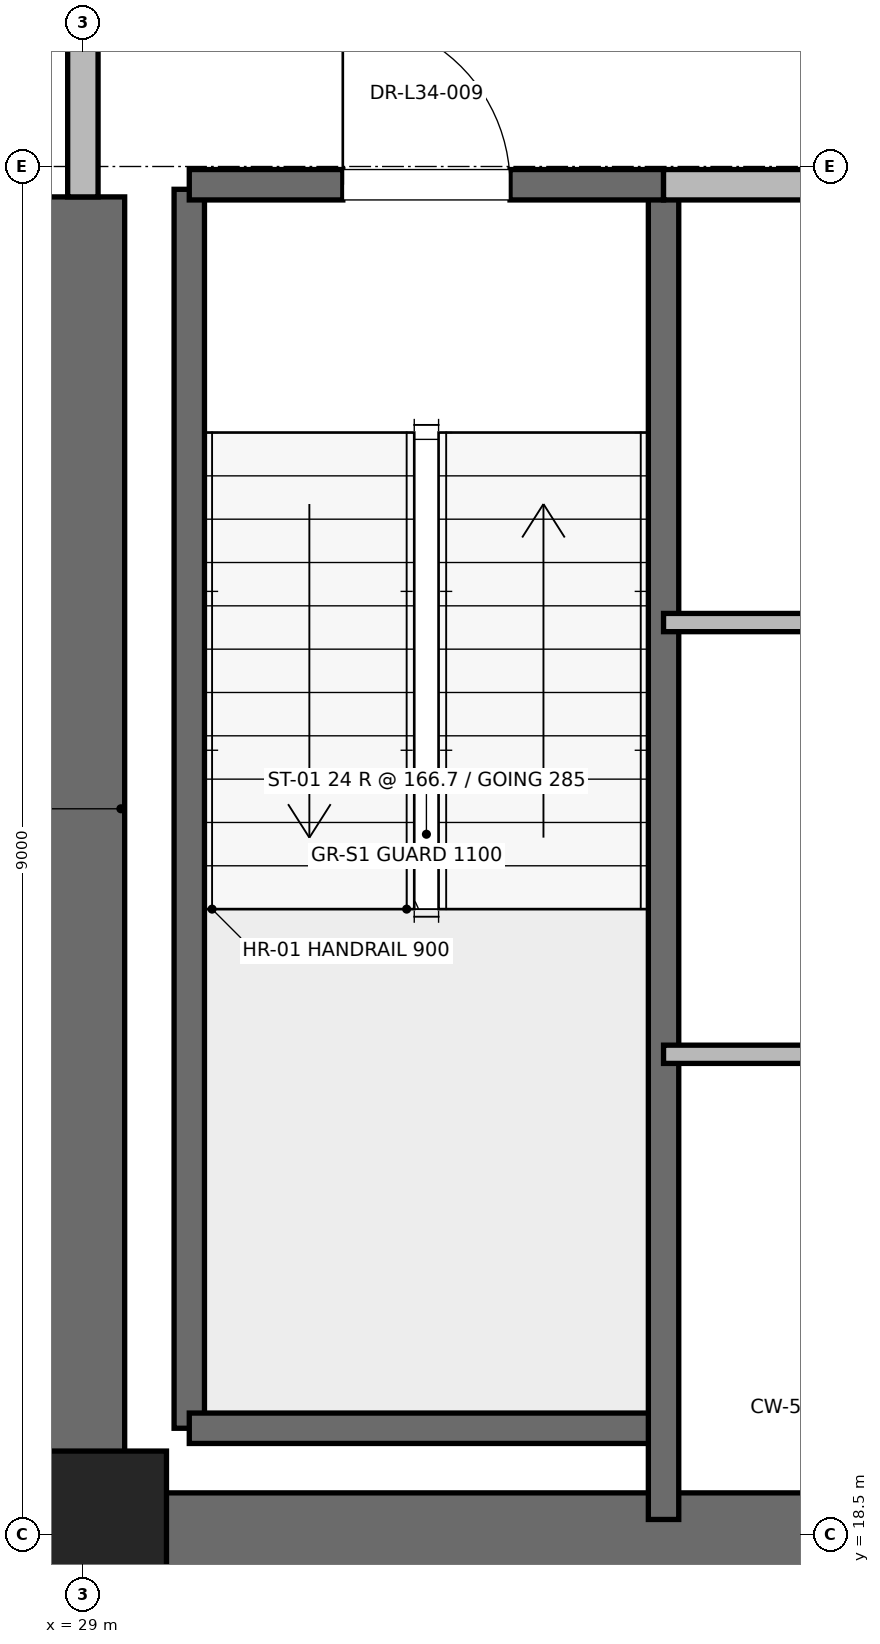
"""IFC4 building model, lengths in metres.
Left out: names, types, materials, properties, quantities, classifications, styles, units other than length and angle.
Written with IfcOpenShell. Run it as: python <this file> out.ifc"""

import sys

from ifc_helpers import new_model, si_unit, direction, frame, frame_2d, origin, origin_2d, place, context, subcontext, project, spatial, rectangle, extrude, element, fill, save


model = new_model("IFC4")
c1 = context("Model", 3, precision=1e-05, world=origin(), true_north=direction((0.0, 1.0)))
c2 = subcontext(c1, "Body", "Model", "MODEL_VIEW")
j1 = project(units=[si_unit("LENGTHUNIT", "METRE"), si_unit("PLANEANGLEUNIT", "RADIAN")], contexts=[c1])
p1 = place(None, origin())
s1 = spatial("IfcSite", under=j1, at=p1, CompositionType="ELEMENT")
p2 = place(p1, origin())
s2 = spatial("IfcBuilding", under=s1, at=p2, CompositionType="ELEMENT")
p3 = place(p2, frame((0.0, 0.0, 148.4)))
s3 = spatial("IfcBuildingStorey", under=s2, at=p3, CompositionType="ELEMENT", Elevation=148.4)
p4 = place(p3, frame((29.0, 18.5, 0.0), z_axis=(0.0, 0.0, 1.0), x_axis=(1.0, 0.0, 0.0)))
e1 = element("IfcColumn", 1, at=p4, inside=s3, PredefinedType="PILASTER", context=c2, shape_type="SweptSolid", body=[
    extrude(rectangle(XDim=1.1, YDim=1.1, at=origin_2d()), origin(), (0.0, 0.0, 1.0), 4.0),
])
p5 = place(p3, frame((29.0, 18.5, 0.0), z_axis=(0.0, 0.0, 1.0), x_axis=(1.0, 0.0, 0.0)))
e2 = element("IfcWall", 2, at=p5, inside=s3, PredefinedType="SHEAR", context=c2, shape_type="SweptSolid", body=[
    extrude(rectangle(XDim=9.2, YDim=0.55, at=frame_2d((4.6, 0.0))), origin(), (0.0, 0.0, 1.0), 3.775),
])
p6 = place(p3, frame((29.0, 18.5, 0.0), z_axis=(0.0, 0.0, 1.0), x_axis=(0.0, 1.0, 0.0)))
e3 = element("IfcWall", 3, at=p6, inside=s3, PredefinedType="SHEAR", context=c2, shape_type="SweptSolid", body=[
    extrude(rectangle(XDim=8.8, YDim=0.55, at=frame_2d((4.4, 0.0))), origin(), (0.0, 0.0, 1.0), 3.775),
])
p7 = place(p3, frame((29.7, 19.2, 0.0), z_axis=(0.0, 0.0, 1.0), x_axis=(0.0, 1.0, 0.0)))
e4 = element("IfcWall", 4, at=p7, inside=s3, PredefinedType="SOLIDWALL", context=c2, shape_type="SweptSolid", body=[
    extrude(rectangle(XDim=8.15, YDim=0.2, at=frame_2d((4.075, 0.0))), origin(), (0.0, 0.0, 1.0), 3.775),
])
p8 = place(p3, frame((29.7, 19.2, 0.0), z_axis=(0.0, 0.0, 1.0), x_axis=(1.0, 0.0, 0.0)))
e5 = element("IfcWall", 5, at=p8, inside=s3, PredefinedType="SOLIDWALL", context=c2, shape_type="SweptSolid", body=[
    extrude(rectangle(XDim=3.12, YDim=0.2, at=frame_2d((1.56, 0.0))), origin(), (0.0, 0.0, 1.0), 3.775),
])
p9 = place(p3, frame((32.82, 18.6, 0.0), z_axis=(0.0, 0.0, 1.0), x_axis=(0.0, 1.0, 0.0)))
e6 = element("IfcWall", 6, at=p9, inside=s3, PredefinedType="SOLIDWALL", context=c2, shape_type="SweptSolid", body=[
    extrude(rectangle(XDim=8.78, YDim=0.2, at=frame_2d((4.39, 0.0))), origin(), (0.0, 0.0, 1.0), 3.775),
])
p10 = place(p3, frame((29.7, 27.38, 0.0), z_axis=(0.0, 0.0, 1.0), x_axis=(1.0, 0.0, 0.0)))
e7 = element("IfcWall", 7, at=p10, inside=s3, PredefinedType="SOLIDWALL", context=c2, shape_type="SweptSolid", body=[
    extrude(rectangle(XDim=3.12, YDim=0.2, at=frame_2d((1.56, 0.0))), origin(), (0.0, 0.0, 1.0), 3.775),
])
p11 = place(p10, frame((1.01, 0.0, 0.0)))
e8 = element("IfcOpeningElement", 8, at=p11, cuts=e7, PredefinedType="OPENING", context=c2, shape_type="SweptSolid", body=[
    extrude(rectangle(XDim=1.1, YDim=2.15, at=frame_2d((0.55, 1.075))), frame((0.0, 0.1, 0.0), z_axis=(0.0, -1.0, 0.0), x_axis=(1.0, 0.0, 0.0)), (0.0, 0.0, 1.0), 0.2),
])
p12 = place(p3, frame((29.0, 27.3, 0.0), z_axis=(0.0, 0.0, 1.0), x_axis=(0.0, 1.0, 0.0)))
e9 = element("IfcWall", 9, at=p12, inside=s3, PredefinedType="PARTITIONING", context=c2, shape_type="SweptSolid", body=[
    extrude(rectangle(XDim=3.4, YDim=0.2, at=frame_2d((1.7, 0.0))), origin(), (0.0, 0.0, 1.0), 2.755),
])
p13 = place(p12, frame((1.125, 0.0, 0.0)))
e10 = element("IfcOpeningElement", 10, at=p13, cuts=e9, PredefinedType="OPENING", context=c2, shape_type="SweptSolid", body=[
    extrude(rectangle(XDim=1.15, YDim=2.2, at=frame_2d((0.575, 1.1))), frame((0.0, 0.1, 0.0), z_axis=(0.0, -1.0, 0.0), x_axis=(1.0, 0.0, 0.0)), (0.0, 0.0, 1.0), 0.2),
])
p14 = place(p3, frame((32.82, 27.38, 0.0), z_axis=(0.0, 0.0, 1.0), x_axis=(1.0, 0.0, 0.0)))
e11 = element("IfcWall", 11, at=p14, inside=s3, PredefinedType="PARTITIONING", context=c2, shape_type="SweptSolid", body=[
    extrude(rectangle(XDim=5.62, YDim=0.2, at=frame_2d((2.81, 0.0))), origin(), (0.0, 0.0, 1.0), 3.775),
])
for number, where, z_axis, x_axis in (
    (12, (32.82, 21.66, 0.0), (0.0, 0.0, 1.0), (1.0, 0.0, 0.0)),
    (13, (32.82, 24.5, 0.0), (0.0, 0.0, 1.0), (1.0, 0.0, 0.0)),
):
    element("IfcWall", number, at=place(p3, frame(where, z_axis=z_axis, x_axis=x_axis)), inside=s3, PredefinedType="PARTITIONING", context=c2, shape_type="SweptSolid", body=[
        extrude(rectangle(XDim=5.23, YDim=0.12, at=frame_2d((2.615, 0.0))), origin(), (0.0, 0.0, 1.0), 2.85),
    ])
p15 = place(p11, origin())
e14 = element("IfcDoor", 14, at=p15, inside=s3, OperationType="SINGLE_SWING_LEFT", PredefinedType="DOOR", context=c2, shape_type="SweptSolid", body=[
    extrude(rectangle(XDim=1.1, YDim=2.15, at=frame_2d((0.55, 1.075))), frame((0.0, 0.025, 0.0), z_axis=(0.0, -1.0, 0.0), x_axis=(1.0, 0.0, 0.0)), (0.0, 0.0, 1.0), 0.05),
])
fill(e8, e14)
save(model, sys.argv[1])
